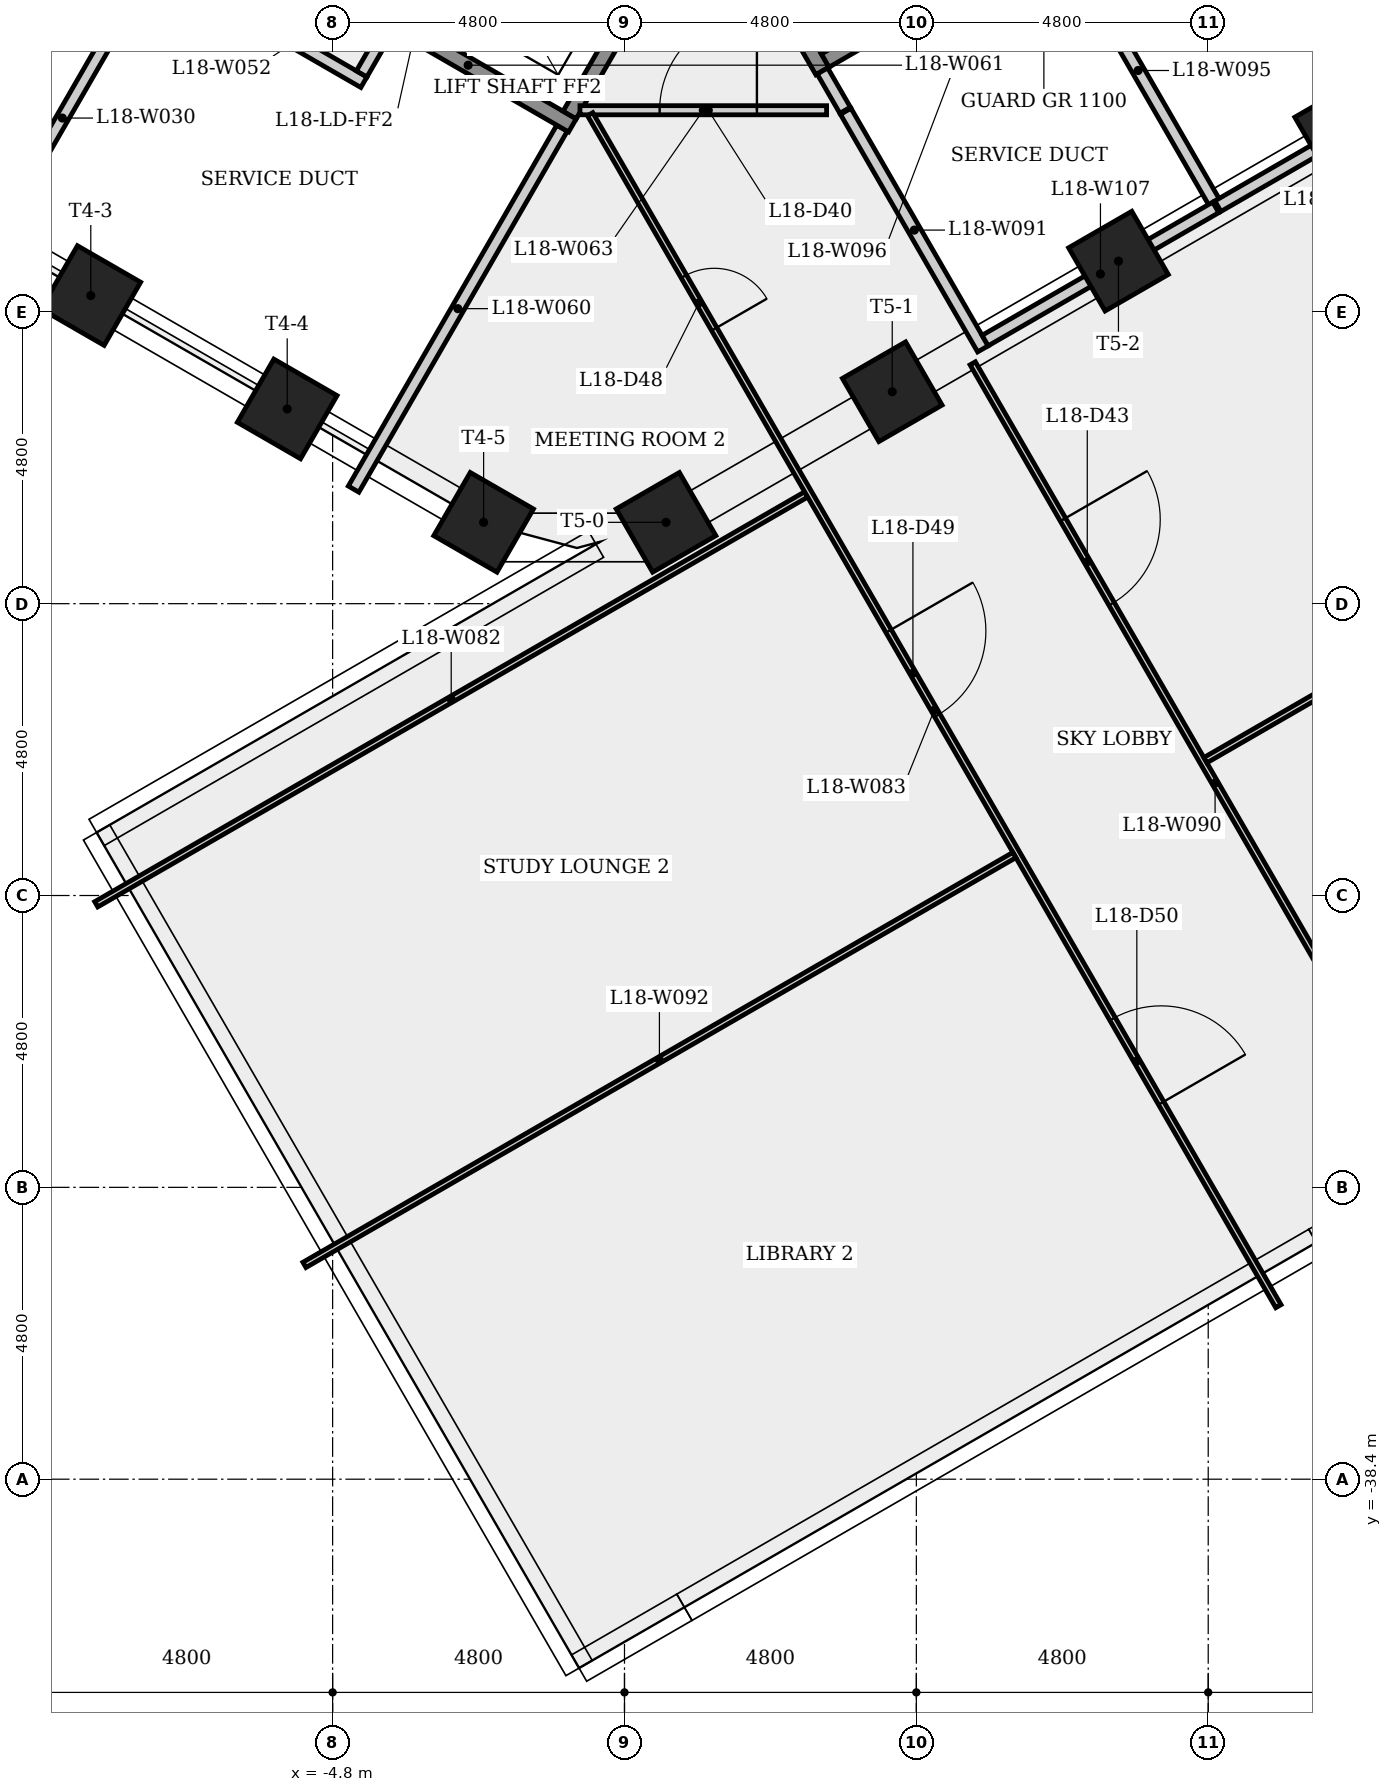
"""IFC4 building model, lengths in metres.
Left out: names, types, materials, properties, quantities, classifications, styles, units other than length and angle.
Written with IfcOpenShell. Run it as: python <this file> out.ifc"""

import sys

from ifc_helpers import new_model, si_unit, direction, frame, frame_2d, origin, origin_2d, place, context, subcontext, project, spatial, rectangle, extrude, element, fill, save


model = new_model("IFC4")
c1 = context("Model", 3, precision=1e-05, world=origin(), true_north=direction((0.0, 1.0)))
c2 = subcontext(c1, "Body", "Model", "MODEL_VIEW")
j1 = project(units=[si_unit("LENGTHUNIT", "METRE"), si_unit("PLANEANGLEUNIT", "RADIAN")], contexts=[c1])
p1 = place(None, origin())
s1 = spatial("IfcSite", under=j1, at=p1, CompositionType="ELEMENT")
p2 = place(p1, origin())
s2 = spatial("IfcBuilding", under=s1, at=p2, CompositionType="ELEMENT")
p3 = place(p2, frame((0.0, 0.0, 70.3)))
s3 = spatial("IfcBuildingStorey", under=s2, at=p3, CompositionType="ELEMENT", Elevation=70.3)
for number, where, z_axis, x_axis in (
    (1, (-8.777, -18.932, 0.0), (0.0, 0.0, 1.0), (-0.5, -0.866, 0.0)),
    (2, (-5.547, -20.797, 0.0), (0.0, 0.0, 1.0), (-0.5, -0.866, 0.0)),
    (3, (-2.317, -22.662, 0.0), (0.0, 0.0, 1.0), (-0.5, -0.866, 0.0)),
    (4, (0.683, -22.662, 0.0), (0.0, 0.0, 1.0), (0.5, -0.866, 0.0)),
    (5, (4.403, -20.514, 0.0), (0.0, 0.0, 1.0), (0.5, -0.866, 0.0)),
    (6, (8.124, -18.366, 0.0), (0.0, 0.0, 1.0), (0.5, -0.866, 0.0)),
    (7, (11.844, -16.219, 0.0), (0.0, 0.0, 1.0), (0.5, -0.866, 0.0)),
):
    element("IfcColumn", number, at=place(p3, frame(where, z_axis=z_axis, x_axis=x_axis)), inside=s3, PredefinedType="COLUMN", context=c2, shape_type="SweptSolid", body=[
        extrude(rectangle(XDim=1.2, YDim=1.2, at=origin_2d()), origin(), (0.0, 0.0, 1.0), 4.0),
    ])
p4 = place(p3, frame((-7.8, -13.51, 0.0), z_axis=(0.0, 0.0, 1.0), x_axis=(-0.499982030767, -0.866035778077, 0.0)))
e8 = element("IfcWall", 8, at=p4, inside=s3, PredefinedType="PLUMBINGWALL", context=c2, shape_type="SweptSolid", body=[
    extrude(rectangle(XDim=5.781, YDim=0.2, at=frame_2d((2.89, 0.0))), origin(), (0.0, 0.0, 1.0), 3.6),
])
p5 = place(p3, frame((-8.356, -13.073, 0.0), z_axis=(0.0, 0.0, 1.0), x_axis=(0.866038532462, -0.499977259774, 0.0)))
e9 = element("IfcWall", 9, at=p5, inside=s3, PredefinedType="PLUMBINGWALL", context=c2, shape_type="SweptSolid", body=[
    extrude(rectangle(XDim=4.7, YDim=0.2, at=frame_2d((2.35, 0.0))), origin(), (0.0, 0.0, 1.0), 3.6),
])
p6 = place(p3, frame((-3.885, -14.529, 0.0), z_axis=(0.0, 0.0, 1.0), x_axis=(-0.499859285417, -0.866106630146, 0.0)))
e10 = element("IfcWall", 10, at=p6, inside=s3, PredefinedType="PLUMBINGWALL", context=c2, shape_type="SweptSolid", body=[
    extrude(rectangle(XDim=0.875, YDim=0.2, at=frame_2d((0.438, 0.0))), origin(), (0.0, 0.0, 1.0), 3.6),
])
p7 = place(p3, frame((-1.027, -16.179, 0.0), z_axis=(0.0, 0.0, 1.0), x_axis=(-0.499984476993, -0.866034365811, 0.0)))
e11 = element("IfcWall", 11, at=p7, inside=s3, PredefinedType="PLUMBINGWALL", context=c2, shape_type="SweptSolid", body=[
    extrude(rectangle(XDim=6.856, YDim=0.2, at=frame_2d((3.428, 0.0))), origin(), (0.0, 0.0, 1.0), 3.6),
])
p8 = place(p3, frame((-0.856, -16.133, 0.0), z_axis=(0.0, 0.0, 1.0), x_axis=(-0.866021716278, 0.500006386895, 0.0)))
e12 = element("IfcWall", 12, at=p8, inside=s3, PredefinedType="SHEAR", context=c2, shape_type="SweptSolid", body=[
    extrude(rectangle(XDim=3.3, YDim=0.25, at=frame_2d((1.65, 0.0))), origin(), (0.0, 0.0, 1.0), 3.6),
])
p9 = place(p3, frame((-0.902, -15.962, 0.0), z_axis=(0.0, 0.0, 1.0), x_axis=(0.499981517636, 0.866036074319, 0.0)))
e13 = element("IfcWall", 13, at=p9, inside=s3, PredefinedType="SHEAR", context=c2, shape_type="SweptSolid", body=[
    extrude(rectangle(XDim=2.61, YDim=0.25, at=frame_2d((1.305, 0.0))), origin(), (0.0, 0.0, 1.0), 3.6),
])
p10 = place(p3, frame((-0.732, -15.885, 0.0), z_axis=(0.0, 0.0, 1.0), x_axis=(1.0, 0.0, 0.0)))
e14 = element("IfcWall", 14, at=p10, inside=s3, PredefinedType="PARTITIONING", context=c2, shape_type="SweptSolid", body=[
    extrude(rectangle(XDim=4.056, YDim=0.15, at=frame_2d((2.028, 0.0))), origin(), (0.0, 0.0, 1.0), 3.6),
])
p11 = place(p10, frame((1.31, 0.0, 0.0)))
e15 = element("IfcOpeningElement", 15, at=p11, cuts=e14, PredefinedType="OPENING", context=c2, shape_type="SweptSolid", body=[
    extrude(rectangle(XDim=1.6, YDim=2.1, at=frame_2d((0.8, 1.05))), frame((0.0, 0.085, 0.0), z_axis=(0.0, -1.0, 0.0), x_axis=(1.0, 0.0, 0.0)), (0.0, 0.0, 1.0), 0.17),
])
p12 = place(p3, frame((2.988, -22.203, 0.0), z_axis=(0.0, 0.0, 1.0), x_axis=(-0.866023652272, -0.500003033696, 0.0)))
e16 = element("IfcWall", 16, at=p12, inside=s3, PredefinedType="PARTITIONING", context=c2, shape_type="SweptSolid", body=[
    extrude(rectangle(XDim=13.482, YDim=0.1, at=frame_2d((6.741, 0.0))), origin(), (0.0, 0.0, 1.0), 3.6),
])
p13 = place(p3, frame((-0.565, -15.949, 0.0), z_axis=(0.0, 0.0, 1.0), x_axis=(0.500000334318, -0.866025210766, 0.0)))
e17 = element("IfcWall", 17, at=p13, inside=s3, PredefinedType="PARTITIONING", context=c2, shape_type="SweptSolid", body=[
    extrude(rectangle(XDim=22.638, YDim=0.1, at=frame_2d((11.319, 0.0))), origin(), (0.0, 0.0, 1.0), 3.6),
])
p14 = place(p13, frame((3.081, 0.0, 0.0)))
e18 = element("IfcOpeningElement", 18, at=p14, cuts=e17, PredefinedType="OPENING", context=c2, shape_type="SweptSolid", body=[
    extrude(rectangle(XDim=1.0, YDim=2.1, at=frame_2d((0.5, 1.05))), frame((0.0, 0.06, 0.0), z_axis=(0.0, -1.0, 0.0), x_axis=(1.0, 0.0, 0.0)), (0.0, 0.0, 1.0), 0.12),
])
p15 = place(p13, frame((9.817, 0.0, 0.0)))
e19 = element("IfcOpeningElement", 19, at=p15, cuts=e17, PredefinedType="OPENING", context=c2, shape_type="SweptSolid", body=[
    extrude(rectangle(XDim=1.6, YDim=2.1, at=frame_2d((0.8, 1.05))), frame((0.0, 0.06, 0.0), z_axis=(0.0, -1.0, 0.0), x_axis=(1.0, 0.0, 0.0)), (0.0, 0.0, 1.0), 0.12),
])
p16 = place(p13, frame((17.182, 0.0, 0.0)))
e20 = element("IfcOpeningElement", 20, at=p16, cuts=e17, PredefinedType="OPENING", context=c2, shape_type="SweptSolid", body=[
    extrude(rectangle(XDim=1.6, YDim=2.1, at=frame_2d((0.8, 1.05))), frame((0.0, 0.06, 0.0), z_axis=(0.0, -1.0, 0.0), x_axis=(1.0, 0.0, 0.0)), (0.0, 0.0, 1.0), 0.12),
])
p17 = place(p3, frame((3.256, -15.239, 0.0), z_axis=(0.0, 0.0, 1.0), x_axis=(-0.50002537861, 0.866010750942, 0.0)))
e21 = element("IfcWall", 21, at=p17, inside=s3, PredefinedType="SHEAR", context=c2, shape_type="SweptSolid", body=[
    extrude(rectangle(XDim=3.0, YDim=0.25, at=frame_2d((1.5, 0.0))), origin(), (0.0, 0.0, 1.0), 3.6),
])
p18 = place(p3, frame((3.628, -15.885, 0.0), z_axis=(0.0, 0.0, 1.0), x_axis=(-0.499977539641, 0.866038370891, 0.0)))
e22 = element("IfcWall", 22, at=p18, inside=s3, PredefinedType="PLUMBINGWALL", context=c2, shape_type="SweptSolid", body=[
    extrude(rectangle(XDim=0.746, YDim=0.2, at=frame_2d((0.373, 0.0))), origin(), (0.0, 0.0, 1.0), 3.6),
])
p19 = place(p3, frame((5.727, -20.047, 0.0), z_axis=(0.0, 0.0, 1.0), x_axis=(0.49999285859, -0.86602952684, 0.0)))
e23 = element("IfcWall", 23, at=p19, inside=s3, PredefinedType="PARTITIONING", context=c2, shape_type="SweptSolid", body=[
    extrude(rectangle(XDim=15.944, YDim=0.1, at=frame_2d((7.972, 0.0))), origin(), (0.0, 0.0, 1.0), 3.6),
])
p20 = place(p19, frame((2.968, 0.0, 0.0)))
e24 = element("IfcOpeningElement", 24, at=p20, cuts=e23, PredefinedType="OPENING", context=c2, shape_type="SweptSolid", body=[
    extrude(rectangle(XDim=1.6, YDim=2.1, at=frame_2d((0.8, 1.05))), frame((0.0, 0.06, 0.0), z_axis=(0.0, -1.0, 0.0), x_axis=(1.0, 0.0, 0.0)), (0.0, 0.0, 1.0), 0.12),
])
p21 = place(p19, frame((12.805, 0.0, 0.0)))
e25 = element("IfcOpeningElement", 25, at=p21, cuts=e23, PredefinedType="OPENING", context=c2, shape_type="SweptSolid", body=[
    extrude(rectangle(XDim=1.0, YDim=2.1, at=frame_2d((0.5, 1.05))), frame((0.0, 0.06, 0.0), z_axis=(0.0, -1.0, 0.0), x_axis=(1.0, 0.0, 0.0)), (0.0, 0.0, 1.0), 0.12),
])
p22 = place(p3, frame((5.894, -19.809, 0.0), z_axis=(0.0, 0.0, 1.0), x_axis=(-0.499980071345, 0.866036909293, 0.0)))
e26 = element("IfcWall", 26, at=p22, inside=s3, PredefinedType="PLUMBINGWALL", context=c2, shape_type="SweptSolid", body=[
    extrude(rectangle(XDim=4.512, YDim=0.2, at=frame_2d((2.256, 0.0))), origin(), (0.0, 0.0, 1.0), 3.6),
])
p23 = place(p3, frame((6.412, -28.134, 0.0), z_axis=(0.0, 0.0, 1.0), x_axis=(-0.86603149334, -0.499989452433, 0.0)))
e27 = element("IfcWall", 27, at=p23, inside=s3, PredefinedType="PARTITIONING", context=c2, shape_type="SweptSolid", body=[
    extrude(rectangle(XDim=13.482, YDim=0.1, at=frame_2d((6.741, 0.0))), origin(), (0.0, 0.0, 1.0), 3.6),
])
p24 = place(p3, frame((7.153, -12.989, 0.0), z_axis=(0.0, 0.0, 1.0), x_axis=(0.499993196246, -0.866029331898, 0.0)))
e28 = element("IfcWall", 28, at=p24, inside=s3, PredefinedType="PLUMBINGWALL", context=c2, shape_type="SweptSolid", body=[
    extrude(rectangle(XDim=5.178, YDim=0.2, at=frame_2d((2.589, 0.0))), origin(), (0.0, 0.0, 1.0), 3.6),
])
p25 = place(p3, frame((3.301, -15.068, 0.0), z_axis=(0.0, 0.0, 1.0), x_axis=(0.866035036182, 0.499983315828, 0.0)))
e29 = element("IfcWall", 29, at=p25, inside=s3, PredefinedType="SHEAR", context=c2, shape_type="SweptSolid", body=[
    extrude(rectangle(XDim=6.4, YDim=0.25, at=frame_2d((3.2, 0.0))), origin(), (0.0, 0.0, 1.0), 4.0),
])
p26 = place(p3, frame((9.724, -17.483, 0.0), z_axis=(0.0, 0.0, 1.0), x_axis=(-0.866032430508, -0.49998782916, 0.0)))
e30 = element("IfcWall", 30, at=p26, inside=s3, PredefinedType="PLUMBINGWALL", context=c2, shape_type="SweptSolid", body=[
    extrude(rectangle(XDim=4.38, YDim=0.2, at=frame_2d((2.19, 0.0))), origin(), (0.0, 0.0, 1.0), 2.675),
])
p27 = place(p3, frame((13.552, -15.273, 0.0), z_axis=(0.0, 0.0, 1.0), x_axis=(-0.866008294434, -0.500029633093, 0.0)))
e31 = element("IfcWall", 31, at=p27, inside=s3, PredefinedType="PLUMBINGWALL", context=c2, shape_type="SweptSolid", body=[
    extrude(rectangle(XDim=4.38, YDim=0.2, at=frame_2d((2.19, 0.0))), origin(), (0.0, 0.0, 1.0), 2.675),
])
p28 = place(p3, frame((19.193, -21.009, 0.0), z_axis=(0.0, 0.0, 1.0), x_axis=(-0.866020851292, -0.500007885066, 0.0)))
e32 = element("IfcWall", 32, at=p28, inside=s3, PredefinedType="PARTITIONING", context=c2, shape_type="SweptSolid", body=[
    extrude(rectangle(XDim=11.131, YDim=0.1, at=frame_2d((5.565, 0.0))), origin(), (0.0, 0.0, 1.0), 3.6),
])
p29 = place(p11, origin())
e33 = element("IfcDoor", 33, at=p29, inside=s3, OperationType="SINGLE_SWING_RIGHT", PredefinedType="DOOR", context=c2, shape_type="SweptSolid", body=[
    extrude(rectangle(XDim=1.6, YDim=2.1, at=frame_2d((0.8, 1.05))), frame((0.0, 0.025, 0.0), z_axis=(0.0, -1.0, 0.0), x_axis=(1.0, 0.0, 0.0)), (0.0, 0.0, 1.0), 0.05),
])
fill(e15, e33)
p30 = place(p20, origin())
e34 = element("IfcDoor", 34, at=p30, inside=s3, OperationType="SINGLE_SWING_LEFT", PredefinedType="DOOR", context=c2, shape_type="SweptSolid", body=[
    extrude(rectangle(XDim=1.6, YDim=2.1, at=frame_2d((0.8, 1.05))), frame((0.0, 0.025, 0.0), z_axis=(0.0, -1.0, 0.0), x_axis=(1.0, 0.0, 0.0)), (0.0, 0.0, 1.0), 0.05),
])
fill(e24, e34)
p31 = place(p14, origin())
e35 = element("IfcDoor", 35, at=p31, inside=s3, OperationType="SINGLE_SWING_RIGHT", PredefinedType="DOOR", context=c2, shape_type="SweptSolid", body=[
    extrude(rectangle(XDim=1.0, YDim=2.1, at=frame_2d((0.5, 1.05))), frame((0.0, 0.025, 0.0), z_axis=(0.0, -1.0, 0.0), x_axis=(1.0, 0.0, 0.0)), (0.0, 0.0, 1.0), 0.05),
])
fill(e18, e35)
p32 = place(p15, origin())
e36 = element("IfcDoor", 36, at=p32, inside=s3, OperationType="SINGLE_SWING_LEFT", PredefinedType="DOOR", context=c2, shape_type="SweptSolid", body=[
    extrude(rectangle(XDim=1.6, YDim=2.1, at=frame_2d((0.8, 1.05))), frame((0.0, 0.025, 0.0), z_axis=(0.0, -1.0, 0.0), x_axis=(1.0, 0.0, 0.0)), (0.0, 0.0, 1.0), 0.05),
])
fill(e19, e36)
p33 = place(p16, origin())
e37 = element("IfcDoor", 37, at=p33, inside=s3, OperationType="SINGLE_SWING_RIGHT", PredefinedType="DOOR", context=c2, shape_type="SweptSolid", body=[
    extrude(rectangle(XDim=1.6, YDim=2.1, at=frame_2d((0.8, 1.05))), frame((0.0, 0.025, 0.0), z_axis=(0.0, -1.0, 0.0), x_axis=(1.0, 0.0, 0.0)), (0.0, 0.0, 1.0), 0.05),
])
fill(e20, e37)
save(model, sys.argv[1])
